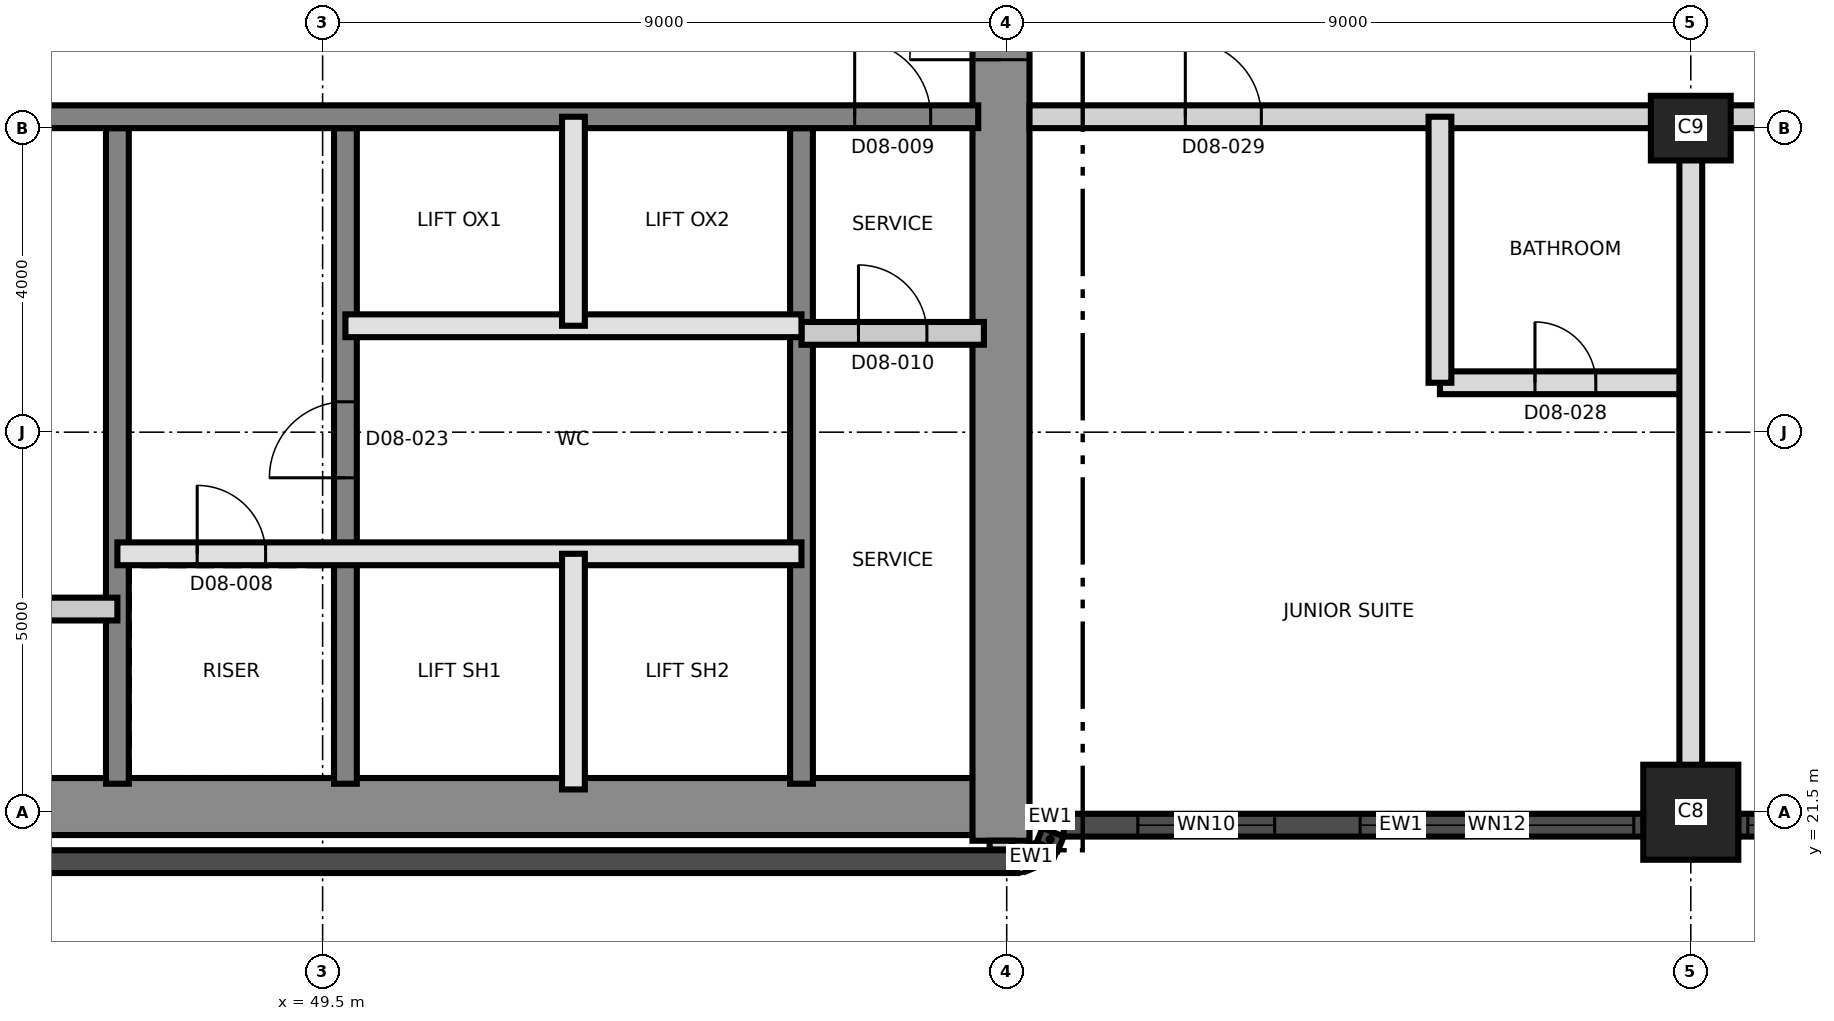
"""IFC4 building model, lengths in metres.
Left out: names, types, materials, properties, quantities, classifications, styles, units other than length and angle.
Written with IfcOpenShell. Run it as: python <this file> out.ifc"""

import sys

from ifc_helpers import new_model, si_unit, direction, frame, frame_2d, origin, origin_2d, place, context, subcontext, project, spatial, rectangle, extrude, element, fill, save


model = new_model("IFC4")
c1 = context("Model", 3, precision=1e-05, world=origin(), true_north=direction((0.0, 1.0)))
c2 = subcontext(c1, "Body", "Model", "MODEL_VIEW")
j1 = project(units=[si_unit("LENGTHUNIT", "METRE"), si_unit("PLANEANGLEUNIT", "RADIAN")], contexts=[c1])
p1 = place(None, origin())
s1 = spatial("IfcSite", under=j1, at=p1, CompositionType="ELEMENT")
p2 = place(p1, origin())
s2 = spatial("IfcBuilding", under=s1, at=p2, CompositionType="ELEMENT")
p3 = place(p2, frame((0.0, 0.0, 98.2)))
s3 = spatial("IfcBuildingStorey", under=s2, at=p3, CompositionType="ELEMENT", Elevation=98.2)
p4 = place(p3, frame((31.125, 21.575, 0.0), z_axis=(0.0, 0.0, 1.0), x_axis=(1.0, 0.0, 0.0)))
e1 = element("IfcWall", 1, at=p4, inside=s3, PredefinedType="SHEAR", context=c2, shape_type="SweptSolid", body=[
    extrude(rectangle(XDim=27.0, YDim=0.75, at=frame_2d((13.5, 0.0))), origin(), (0.0, 0.0, 1.0), 3.7),
])
p5 = place(p3, frame((58.425, 21.125, 0.0), z_axis=(0.0, 0.0, 1.0), x_axis=(0.0, 1.0, 0.0)))
e2 = element("IfcWall", 2, at=p5, inside=s3, PredefinedType="SHEAR", context=c2, shape_type="SweptSolid", body=[
    extrude(rectangle(XDim=18.75, YDim=0.75, at=frame_2d((9.375, 0.0))), origin(), (0.0, 0.0, 1.0), 3.7),
])
p6 = place(p5, frame((10.275, 0.0, 0.0)))
e3 = element("IfcOpeningElement", 3, at=p6, cuts=e2, PredefinedType="OPENING", context=c2, shape_type="SweptSolid", body=[
    extrude(rectangle(XDim=1.2, YDim=2.1, at=frame_2d((0.6, 1.05))), frame((0.0, 0.385, 0.0), z_axis=(0.0, -1.0, 0.0), x_axis=(1.0, 0.0, 0.0)), (0.0, 0.0, 1.0), 0.77),
])
p7 = place(p3, frame((46.8, 21.875, 0.0), z_axis=(0.0, 0.0, 1.0), x_axis=(0.0, 1.0, 0.0)))
e4 = element("IfcWall", 4, at=p7, inside=s3, PredefinedType="SHEAR", context=c2, shape_type="SweptSolid", body=[
    extrude(rectangle(XDim=8.625, YDim=0.3, at=frame_2d((4.312, 0.0))), origin(), (0.0, 0.0, 1.0), 3.7),
])
p8 = place(p3, frame((49.8, 21.875, 0.0), z_axis=(0.0, 0.0, 1.0), x_axis=(0.0, 1.0, 0.0)))
e5 = element("IfcWall", 5, at=p8, inside=s3, PredefinedType="SHEAR", context=c2, shape_type="SweptSolid", body=[
    extrude(rectangle(XDim=8.625, YDim=0.3, at=frame_2d((4.312, 0.0))), origin(), (0.0, 0.0, 1.0), 3.7),
])
p9 = place(p8, frame((4.025, 0.0, 0.0)))
e6 = element("IfcOpeningElement", 6, at=p9, cuts=e5, PredefinedType="OPENING", context=c2, shape_type="SweptSolid", body=[
    extrude(rectangle(XDim=1.0, YDim=2.1, at=frame_2d((0.5, 1.05))), frame((0.0, 0.16, 0.0), z_axis=(0.0, -1.0, 0.0), x_axis=(1.0, 0.0, 0.0)), (0.0, 0.0, 1.0), 0.32),
])
p10 = place(p3, frame((55.8, 21.875, 0.0), z_axis=(0.0, 0.0, 1.0), x_axis=(0.0, 1.0, 0.0)))
e7 = element("IfcWall", 7, at=p10, inside=s3, PredefinedType="SHEAR", context=c2, shape_type="SweptSolid", body=[
    extrude(rectangle(XDim=8.625, YDim=0.3, at=frame_2d((4.312, 0.0))), origin(), (0.0, 0.0, 1.0), 3.7),
])
p11 = place(p3, frame((31.875, 30.65, 0.0), z_axis=(0.0, 0.0, 1.0), x_axis=(1.0, 0.0, 0.0)))
e8 = element("IfcWall", 8, at=p11, inside=s3, PredefinedType="SHEAR", context=c2, shape_type="SweptSolid", body=[
    extrude(rectangle(XDim=26.25, YDim=0.3, at=frame_2d((13.125, 0.0))), origin(), (0.0, 0.0, 1.0), 3.7),
])
p12 = place(p11, frame((24.625, 0.0, 0.0)))
e9 = element("IfcOpeningElement", 9, at=p12, cuts=e8, PredefinedType="OPENING", context=c2, shape_type="SweptSolid", body=[
    extrude(rectangle(XDim=1.0, YDim=2.1, at=frame_2d((0.5, 1.05))), frame((0.0, 0.16, 0.0), z_axis=(0.0, -1.0, 0.0), x_axis=(1.0, 0.0, 0.0)), (0.0, 0.0, 1.0), 0.32),
])
p13 = place(p11, frame((11.425, 0.0, 0.0)))
e10 = element("IfcOpeningElement", 10, at=p13, cuts=e8, PredefinedType="OPENING", context=c2, shape_type="SweptSolid", body=[
    extrude(rectangle(XDim=1.0, YDim=2.1, at=frame_2d((0.5, 1.05))), frame((0.0, 0.16, 0.0), z_axis=(0.0, -1.0, 0.0), x_axis=(1.0, 0.0, 0.0)), (0.0, 0.0, 1.0), 0.32),
])
p14 = place(p3, frame((67.5, 21.5, 0.0), z_axis=(0.0, 0.0, 1.0), x_axis=(1.0, 0.0, 0.0)))
e11 = element("IfcColumn", 11, at=p14, inside=s3, PredefinedType="COLUMN", context=c2, shape_type="SweptSolid", body=[
    extrude(rectangle(XDim=1.25, YDim=1.25, at=origin_2d()), origin(), (0.0, 0.0, 1.0), 3.7),
])
p15 = place(p3, frame((67.5, 30.5, 0.0), z_axis=(0.0, 0.0, 1.0), x_axis=(1.0, 0.0, 0.0)))
e12 = element("IfcColumn", 12, at=p15, inside=s3, PredefinedType="COLUMN", context=c2, shape_type="SweptSolid", body=[
    extrude(rectangle(XDim=1.05, YDim=0.85, at=origin_2d()), origin(), (0.0, 0.0, 1.0), 3.7),
])
p16 = place(p3, frame((31.36, 20.85, 0.0), z_axis=(0.0, 0.0, 1.0), x_axis=(1.0, 0.0, 0.0)))
e13 = element("IfcWall", 13, at=p16, inside=s3, PredefinedType="SOLIDWALL", context=c2, shape_type="SweptSolid", body=[
    extrude(rectangle(XDim=27.281, YDim=0.3, at=frame_2d((13.64, 0.0))), origin(), (0.0, 0.0, 1.0), 3.4),
])
p17 = place(p3, frame((58.698, 20.861, 0.0), z_axis=(0.0, 0.0, 1.0), x_axis=(0.923757413239, 0.38297812142, 0.0)))
e14 = element("IfcWall", 14, at=p17, inside=s3, PredefinedType="SOLIDWALL", context=c2, shape_type="SweptSolid", body=[
    extrude(rectangle(XDim=0.275, YDim=0.3, at=frame_2d((0.138, 0.0))), origin(), (0.0, 0.0, 1.0), 3.4),
])
p18 = place(p3, frame((59.033, 21.048, 0.0), z_axis=(0.0, 0.0, 1.0), x_axis=(0.383262727373, 0.923639367831, 0.0)))
e15 = element("IfcWall", 15, at=p18, inside=s3, PredefinedType="SOLIDWALL", context=c2, shape_type="SweptSolid", body=[
    extrude(rectangle(XDim=0.205, YDim=0.3, at=frame_2d((0.103, 0.0))), origin(), (0.0, 0.0, 1.0), 3.4),
])
p19 = place(p3, frame((59.25, 21.33, 0.0), z_axis=(0.0, 0.0, 1.0), x_axis=(1.0, 0.0, 0.0)))
e16 = element("IfcWall", 16, at=p19, inside=s3, PredefinedType="SOLIDWALL", context=c2, shape_type="SweptSolid", body=[
    extrude(rectangle(XDim=8.875, YDim=0.3, at=frame_2d((4.438, 0.0))), origin(), (0.0, 0.0, 1.0), 3.4),
])
p20 = place(p19, frame((0.975, 0.0, 0.3)))
e17 = element("IfcOpeningElement", 17, at=p20, cuts=e16, PredefinedType="OPENING", context=c2, shape_type="SweptSolid", body=[
    extrude(rectangle(XDim=1.8, YDim=2.4, at=frame_2d((0.9, 1.2))), frame((0.0, 0.16, 0.0), z_axis=(0.0, -1.0, 0.0), x_axis=(1.0, 0.0, 0.0)), (0.0, 0.0, 1.0), 0.32),
])
p21 = place(p19, frame((3.9, 0.0, 0.9)))
e18 = element("IfcOpeningElement", 18, at=p21, cuts=e16, PredefinedType="OPENING", context=c2, shape_type="SweptSolid", body=[
    extrude(rectangle(XDim=3.6, YDim=1.5, at=frame_2d((1.8, 0.75))), frame((0.0, 0.16, 0.0), z_axis=(0.0, -1.0, 0.0), x_axis=(1.0, 0.0, 0.0)), (0.0, 0.0, 1.0), 0.32),
])
p22 = place(p3, frame((68.125, 21.33, 0.0), z_axis=(0.0, 0.0, 1.0), x_axis=(1.0, 0.0, 0.0)))
e19 = element("IfcWall", 19, at=p22, inside=s3, PredefinedType="SOLIDWALL", context=c2, shape_type="SweptSolid", body=[
    extrude(rectangle(XDim=7.75, YDim=0.3, at=frame_2d((3.875, 0.0))), origin(), (0.0, 0.0, 1.0), 2.75),
])
p23 = place(p22, frame((0.125, 0.0, 0.9)))
e20 = element("IfcOpeningElement", 20, at=p23, cuts=e19, PredefinedType="OPENING", context=c2, shape_type="SweptSolid", body=[
    extrude(rectangle(XDim=3.6, YDim=1.5, at=frame_2d((1.8, 0.75))), frame((0.0, 0.16, 0.0), z_axis=(0.0, -1.0, 0.0), x_axis=(1.0, 0.0, 0.0)), (0.0, 0.0, 1.0), 0.32),
])
p24 = place(p22, frame((4.025, 0.0, 0.9)))
e21 = element("IfcOpeningElement", 21, at=p24, cuts=e19, PredefinedType="OPENING", context=c2, shape_type="SweptSolid", body=[
    extrude(rectangle(XDim=3.6, YDim=1.5, at=frame_2d((1.8, 0.75))), frame((0.0, 0.16, 0.0), z_axis=(0.0, -1.0, 0.0), x_axis=(1.0, 0.0, 0.0)), (0.0, 0.0, 1.0), 0.32),
])
p25 = place(p3, frame((40.8, 24.173, 0.0), z_axis=(0.0, 0.0, 1.0), x_axis=(1.0, 0.0, 0.0)))
e22 = element("IfcWall", 22, at=p25, inside=s3, PredefinedType="PARTITIONING", context=c2, shape_type="SweptSolid", body=[
    extrude(rectangle(XDim=6.0, YDim=0.3, at=frame_2d((3.0, 0.0))), origin(), (0.0, 0.0, 1.0), 3.4),
])
p26 = place(p25, frame((2.5, 0.0, 0.0)))
e23 = element("IfcOpeningElement", 23, at=p26, cuts=e22, PredefinedType="OPENING", context=c2, shape_type="SweptSolid", body=[
    extrude(rectangle(XDim=1.0, YDim=2.1, at=frame_2d((0.5, 1.05))), frame((0.0, 0.16, 0.0), z_axis=(0.0, -1.0, 0.0), x_axis=(1.0, 0.0, 0.0)), (0.0, 0.0, 1.0), 0.32),
])
p27 = place(p3, frame((46.8, 24.9, 0.0), z_axis=(0.0, 0.0, 1.0), x_axis=(1.0, 0.0, 0.0)))
e24 = element("IfcWall", 24, at=p27, inside=s3, PredefinedType="SOLIDWALL", context=c2, shape_type="SweptSolid", body=[
    extrude(rectangle(XDim=9.0, YDim=0.3, at=frame_2d((4.5, 0.0))), origin(), (0.0, 0.0, 1.0), 3.4),
])
p28 = place(p27, frame((1.05, 0.0, 0.0)))
e25 = element("IfcOpeningElement", 25, at=p28, cuts=e24, PredefinedType="OPENING", context=c2, shape_type="SweptSolid", body=[
    extrude(rectangle(XDim=0.9, YDim=2.1, at=frame_2d((0.45, 1.05))), frame((0.0, 0.16, 0.0), z_axis=(0.0, -1.0, 0.0), x_axis=(1.0, 0.0, 0.0)), (0.0, 0.0, 1.0), 0.32),
])
p29 = place(p3, frame((55.8, 27.8, 0.0), z_axis=(0.0, 0.0, 1.0), x_axis=(1.0, 0.0, 0.0)))
e26 = element("IfcWall", 26, at=p29, inside=s3, PredefinedType="PARTITIONING", context=c2, shape_type="SweptSolid", body=[
    extrude(rectangle(XDim=2.4, YDim=0.3, at=frame_2d((1.2, 0.0))), origin(), (0.0, 0.0, 1.0), 3.4),
])
p30 = place(p29, frame((0.75, 0.0, 0.0)))
e27 = element("IfcOpeningElement", 27, at=p30, cuts=e26, PredefinedType="OPENING", context=c2, shape_type="SweptSolid", body=[
    extrude(rectangle(XDim=0.9, YDim=2.1, at=frame_2d((0.45, 1.05))), frame((0.0, 0.16, 0.0), z_axis=(0.0, -1.0, 0.0), x_axis=(1.0, 0.0, 0.0)), (0.0, 0.0, 1.0), 0.32),
])
p31 = place(p3, frame((49.8, 27.9, 0.0), z_axis=(0.0, 0.0, 1.0), x_axis=(1.0, 0.0, 0.0)))
e28 = element("IfcWall", 28, at=p31, inside=s3, PredefinedType="SOLIDWALL", context=c2, shape_type="SweptSolid", body=[
    extrude(rectangle(XDim=6.0, YDim=0.3, at=frame_2d((3.0, 0.0))), origin(), (0.0, 0.0, 1.0), 3.4),
])
p32 = place(p3, frame((52.8, 21.8, 0.0), z_axis=(0.0, 0.0, 1.0), x_axis=(0.0, 1.0, 0.0)))
e29 = element("IfcWall", 29, at=p32, inside=s3, PredefinedType="SOLIDWALL", context=c2, shape_type="SweptSolid", body=[
    extrude(rectangle(XDim=3.1, YDim=0.3, at=frame_2d((1.55, 0.0))), origin(), (0.0, 0.0, 1.0), 3.4),
])
p33 = place(p3, frame((52.8, 27.9, 0.0), z_axis=(0.0, 0.0, 1.0), x_axis=(0.0, 1.0, 0.0)))
e30 = element("IfcWall", 30, at=p33, inside=s3, PredefinedType="SOLIDWALL", context=c2, shape_type="SweptSolid", body=[
    extrude(rectangle(XDim=2.75, YDim=0.3, at=frame_2d((1.375, 0.0))), origin(), (0.0, 0.0, 1.0), 3.4),
])
p34 = place(p3, frame((64.2, 27.15, 0.0), z_axis=(0.0, 0.0, 1.0), x_axis=(1.0, 0.0, 0.0)))
e31 = element("IfcWall", 31, at=p34, inside=s3, PredefinedType="PARTITIONING", context=c2, shape_type="SweptSolid", body=[
    extrude(rectangle(XDim=3.3, YDim=0.3, at=frame_2d((1.65, 0.0))), origin(), (0.0, 0.0, 1.0), 3.4),
])
p35 = place(p34, frame((1.25, 0.0, 0.0)))
e32 = element("IfcOpeningElement", 32, at=p35, cuts=e31, PredefinedType="OPENING", context=c2, shape_type="SweptSolid", body=[
    extrude(rectangle(XDim=0.8, YDim=2.1, at=frame_2d((0.4, 1.05))), frame((0.0, 0.16, 0.0), z_axis=(0.0, -1.0, 0.0), x_axis=(1.0, 0.0, 0.0)), (0.0, 0.0, 1.0), 0.32),
])
p36 = place(p3, frame((58.8, 30.65, 0.0), z_axis=(0.0, 0.0, 1.0), x_axis=(1.0, 0.0, 0.0)))
e33 = element("IfcWall", 33, at=p36, inside=s3, PredefinedType="PARTITIONING", context=c2, shape_type="SweptSolid", body=[
    extrude(rectangle(XDim=26.53, YDim=0.3, at=frame_2d((13.265, 0.0))), origin(), (0.0, 0.0, 1.0), 3.4),
])
p37 = place(p36, frame((2.05, 0.0, 0.0)))
e34 = element("IfcOpeningElement", 34, at=p37, cuts=e33, PredefinedType="OPENING", context=c2, shape_type="SweptSolid", body=[
    extrude(rectangle(XDim=1.0, YDim=2.4, at=frame_2d((0.5, 1.2))), frame((0.0, 0.16, 0.0), z_axis=(0.0, -1.0, 0.0), x_axis=(1.0, 0.0, 0.0)), (0.0, 0.0, 1.0), 0.32),
])
p38 = place(p36, frame((9.85, 0.0, 0.0)))
e35 = element("IfcOpeningElement", 35, at=p38, cuts=e33, PredefinedType="OPENING", context=c2, shape_type="SweptSolid", body=[
    extrude(rectangle(XDim=1.0, YDim=2.1, at=frame_2d((0.5, 1.05))), frame((0.0, 0.16, 0.0), z_axis=(0.0, -1.0, 0.0), x_axis=(1.0, 0.0, 0.0)), (0.0, 0.0, 1.0), 0.32),
])
p39 = place(p36, frame((15.7, 0.0, 0.0)))
e36 = element("IfcOpeningElement", 36, at=p39, cuts=e33, PredefinedType="OPENING", context=c2, shape_type="SweptSolid", body=[
    extrude(rectangle(XDim=1.0, YDim=2.1, at=frame_2d((0.5, 1.05))), frame((0.0, 0.16, 0.0), z_axis=(0.0, -1.0, 0.0), x_axis=(1.0, 0.0, 0.0)), (0.0, 0.0, 1.0), 0.32),
])
p40 = place(p36, frame((18.835, 0.0, 0.0)))
e37 = element("IfcOpeningElement", 37, at=p40, cuts=e33, PredefinedType="OPENING", context=c2, shape_type="SweptSolid", body=[
    extrude(rectangle(XDim=1.2, YDim=2.1, at=frame_2d((0.6, 1.05))), frame((0.0, 0.16, 0.0), z_axis=(0.0, -1.0, 0.0), x_axis=(1.0, 0.0, 0.0)), (0.0, 0.0, 1.0), 0.32),
])
p41 = place(p36, frame((22.085, 0.0, 0.0)))
e38 = element("IfcOpeningElement", 38, at=p41, cuts=e33, PredefinedType="OPENING", context=c2, shape_type="SweptSolid", body=[
    extrude(rectangle(XDim=1.0, YDim=2.1, at=frame_2d((0.5, 1.05))), frame((0.0, 0.16, 0.0), z_axis=(0.0, -1.0, 0.0), x_axis=(1.0, 0.0, 0.0)), (0.0, 0.0, 1.0), 0.32),
])
p42 = place(p3, frame((64.2, 27.15, 0.0), z_axis=(0.0, 0.0, 1.0), x_axis=(0.0, 1.0, 0.0)))
e39 = element("IfcWall", 39, at=p42, inside=s3, PredefinedType="PARTITIONING", context=c2, shape_type="SweptSolid", body=[
    extrude(rectangle(XDim=3.5, YDim=0.3, at=frame_2d((1.75, 0.0))), origin(), (0.0, 0.0, 1.0), 3.4),
])
p43 = place(p3, frame((67.5, 21.53, 0.0), z_axis=(0.0, 0.0, 1.0), x_axis=(0.0, 1.0, 0.0)))
e40 = element("IfcWall", 40, at=p43, inside=s3, PredefinedType="PARTITIONING", context=c2, shape_type="SweptSolid", body=[
    extrude(rectangle(XDim=9.12, YDim=0.3, at=frame_2d((4.56, 0.0))), origin(), (0.0, 0.0, 1.0), 3.4),
])
p44 = place(p3, frame((58.425, 21.125, 0.0), z_axis=(0.0, 0.0, 1.0), x_axis=(0.0, -1.0, 0.0)))
e41 = element("IfcWall", 41, at=p44, inside=s3, PredefinedType="PARTITIONING", context=c2, shape_type="SweptSolid", body=[
    extrude(rectangle(XDim=0.115, YDim=0.3, at=frame_2d((0.058, 0.0))), origin(), (0.0, 0.0, 1.0), 3.4),
])
p45 = place(p20, origin())
e42 = element("IfcWindow", 42, at=p45, inside=s3, PartitioningType="SINGLE_PANEL", PredefinedType="WINDOW", context=c2, shape_type="SweptSolid", body=[
    extrude(rectangle(XDim=1.8, YDim=2.4, at=frame_2d((0.9, 1.2))), frame((0.0, 0.03, 0.0), z_axis=(0.0, -1.0, 0.0), x_axis=(1.0, 0.0, 0.0)), (0.0, 0.0, 1.0), 0.06),
])
fill(e17, e42)
p46 = place(p21, origin())
e43 = element("IfcWindow", 43, at=p46, inside=s3, PartitioningType="SINGLE_PANEL", PredefinedType="WINDOW", context=c2, shape_type="SweptSolid", body=[
    extrude(rectangle(XDim=3.6, YDim=1.5, at=frame_2d((1.8, 0.75))), frame((0.0, 0.03, 0.0), z_axis=(0.0, -1.0, 0.0), x_axis=(1.0, 0.0, 0.0)), (0.0, 0.0, 1.0), 0.06),
])
fill(e18, e43)
p47 = place(p23, origin())
e44 = element("IfcWindow", 44, at=p47, inside=s3, PartitioningType="SINGLE_PANEL", PredefinedType="WINDOW", context=c2, shape_type="SweptSolid", body=[
    extrude(rectangle(XDim=3.6, YDim=1.5, at=frame_2d((1.8, 0.75))), frame((0.0, 0.03, 0.0), z_axis=(0.0, -1.0, 0.0), x_axis=(1.0, 0.0, 0.0)), (0.0, 0.0, 1.0), 0.06),
])
fill(e20, e44)
p48 = place(p28, origin())
e45 = element("IfcDoor", 45, at=p48, inside=s3, OperationType="SINGLE_SWING_RIGHT", PredefinedType="DOOR", context=c2, shape_type="SweptSolid", body=[
    extrude(rectangle(XDim=0.9, YDim=2.1, at=frame_2d((0.45, 1.05))), frame((0.0, 0.025, 0.0), z_axis=(0.0, -1.0, 0.0), x_axis=(1.0, 0.0, 0.0)), (0.0, 0.0, 1.0), 0.05),
])
fill(e25, e45)
p49 = place(p12, origin())
e46 = element("IfcDoor", 46, at=p49, inside=s3, OperationType="SINGLE_SWING_LEFT", PredefinedType="DOOR", context=c2, shape_type="SweptSolid", body=[
    extrude(rectangle(XDim=1.0, YDim=2.1, at=frame_2d((0.5, 1.05))), frame((0.0, 0.025, 0.0), z_axis=(0.0, -1.0, 0.0), x_axis=(1.0, 0.0, 0.0)), (0.0, 0.0, 1.0), 0.05),
])
fill(e9, e46)
p50 = place(p30, origin())
e47 = element("IfcDoor", 47, at=p50, inside=s3, OperationType="SINGLE_SWING_RIGHT", PredefinedType="DOOR", context=c2, shape_type="SweptSolid", body=[
    extrude(rectangle(XDim=0.9, YDim=2.1, at=frame_2d((0.45, 1.05))), frame((0.0, 0.025, 0.0), z_axis=(0.0, -1.0, 0.0), x_axis=(1.0, 0.0, 0.0)), (0.0, 0.0, 1.0), 0.05),
])
fill(e27, e47)
p51 = place(p6, origin())
e48 = element("IfcDoor", 48, at=p51, inside=s3, OperationType="SINGLE_SWING_LEFT", PredefinedType="DOOR", context=c2, shape_type="SweptSolid", body=[
    extrude(rectangle(XDim=1.2, YDim=2.1, at=frame_2d((0.6, 1.05))), frame((0.0, 0.025, 0.0), z_axis=(0.0, -1.0, 0.0), x_axis=(1.0, 0.0, 0.0)), (0.0, 0.0, 1.0), 0.05),
])
fill(e3, e48)
p52 = place(p9, origin())
e49 = element("IfcDoor", 49, at=p52, inside=s3, OperationType="SINGLE_SWING_LEFT", PredefinedType="DOOR", context=c2, shape_type="SweptSolid", body=[
    extrude(rectangle(XDim=1.0, YDim=2.1, at=frame_2d((0.5, 1.05))), frame((0.0, 0.025, 0.0), z_axis=(0.0, -1.0, 0.0), x_axis=(1.0, 0.0, 0.0)), (0.0, 0.0, 1.0), 0.05),
])
fill(e6, e49)
p53 = place(p35, origin())
e50 = element("IfcDoor", 50, at=p53, inside=s3, OperationType="SINGLE_SWING_LEFT", PredefinedType="DOOR", context=c2, shape_type="SweptSolid", body=[
    extrude(rectangle(XDim=0.8, YDim=2.1, at=frame_2d((0.4, 1.05))), frame((0.0, 0.025, 0.0), z_axis=(0.0, -1.0, 0.0), x_axis=(1.0, 0.0, 0.0)), (0.0, 0.0, 1.0), 0.05),
])
fill(e32, e50)
p54 = place(p37, origin())
e51 = element("IfcDoor", 51, at=p54, inside=s3, OperationType="SINGLE_SWING_LEFT", PredefinedType="DOOR", context=c2, shape_type="SweptSolid", body=[
    extrude(rectangle(XDim=1.0, YDim=2.4, at=frame_2d((0.5, 1.2))), frame((0.0, 0.025, 0.0), z_axis=(0.0, -1.0, 0.0), x_axis=(1.0, 0.0, 0.0)), (0.0, 0.0, 1.0), 0.05),
])
fill(e34, e51)
save(model, sys.argv[1])
